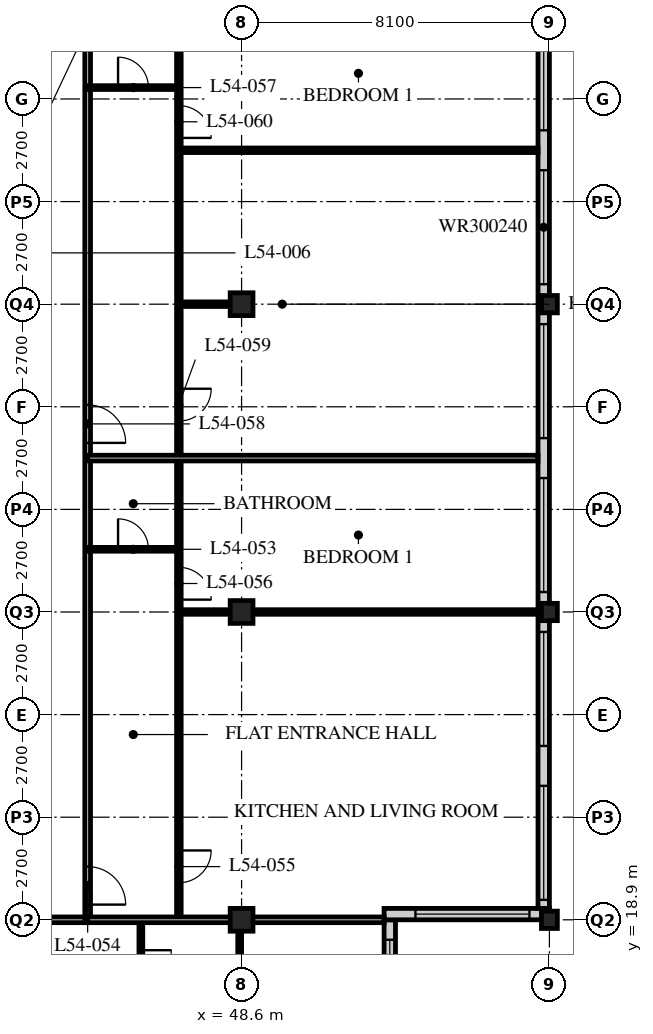
"""IFC4 building model, lengths in metres.
Left out: names, types, materials, properties, quantities, classifications, styles, units other than length and angle.
Written with IfcOpenShell. Run it as: python <this file> out.ifc"""

import sys

from ifc_helpers import new_model, si_unit, direction, frame, frame_2d, origin, origin_2d, place, context, subcontext, project, spatial, rectangle, hollow_rectangle, i_section, extrude, element, fill, save


model = new_model("IFC4")
c1 = context("Model", 3, precision=1e-05, world=origin(), true_north=direction((0.0, 1.0)))
c2 = subcontext(c1, "Body", "Model", "MODEL_VIEW")
j1 = project(units=[si_unit("LENGTHUNIT", "METRE"), si_unit("PLANEANGLEUNIT", "RADIAN")], contexts=[c1])
p1 = place(None, origin())
s1 = spatial("IfcSite", under=j1, at=p1, CompositionType="ELEMENT")
p2 = place(p1, origin())
s2 = spatial("IfcBuilding", under=s1, at=p2, CompositionType="ELEMENT")
p3 = place(p2, frame((0.0, 0.0, 210.0)))
s3 = spatial("IfcBuildingStorey", under=s2, at=p3, CompositionType="ELEMENT", Elevation=210.0)
for number, where, z_axis, x_axis in (
    (1, (48.6, 18.9, 0.0), (0.0, 0.0, 1.0), (1.0, 0.0, 0.0)),
    (2, (48.6, 27.0, 0.0), (0.0, 0.0, 1.0), (1.0, 0.0, 0.0)),
    (3, (48.6, 35.1, 0.0), (0.0, 0.0, 1.0), (1.0, 0.0, 0.0)),
):
    element("IfcColumn", number, at=place(p3, frame(where, z_axis=z_axis, x_axis=x_axis)), inside=s3, PredefinedType="COLUMN", context=c2, shape_type="SweptSolid", body=[
        extrude(hollow_rectangle(XDim=0.6, YDim=0.6, WallThickness=0.05, at=origin_2d()), origin(), (0.0, 0.0, 1.0), 3.6),
    ])
for number, where, z_axis, x_axis in (
    (4, (56.7, 18.9, 0.0), (0.0, 0.0, 1.0), (1.0, 0.0, 0.0)),
    (5, (56.7, 27.0, 0.0), (0.0, 0.0, 1.0), (1.0, 0.0, 0.0)),
    (6, (56.7, 35.1, 0.0), (0.0, 0.0, 1.0), (1.0, 0.0, 0.0)),
):
    element("IfcColumn", number, at=place(p3, frame(where, z_axis=z_axis, x_axis=x_axis)), inside=s3, PredefinedType="COLUMN", context=c2, shape_type="SweptSolid", body=[
        extrude(i_section(OverallWidth=0.418, OverallDepth=0.456, WebThickness=0.042, FlangeThickness=0.067, FilletRadius=0.015, at=origin_2d()), origin(), (0.0, 0.0, 1.0), 3.6),
    ])
p4 = place(p3, frame((52.5, 15.15, 0.0), z_axis=(0.0, 0.0, 1.0), x_axis=(0.0, 1.0, 0.0)))
e7 = element("IfcWall", 7, at=p4, inside=s3, PredefinedType="SOLIDWALL", context=c2, shape_type="SweptSolid", body=[
    extrude(rectangle(XDim=3.75, YDim=0.3, at=frame_2d((1.875, 0.0))), origin(), (0.0, 0.0, 1.0), 3.39),
])
p5 = place(p4, frame((0.225, 0.0, 0.6)))
e8 = element("IfcOpeningElement", 8, at=p5, cuts=e7, PredefinedType="OPENING", context=c2, shape_type="SweptSolid", body=[
    extrude(rectangle(XDim=3.0, YDim=2.0, at=frame_2d((1.5, 1.0))), frame((0.0, 0.16, 0.0), z_axis=(0.0, -1.0, 0.0), x_axis=(1.0, 0.0, 0.0)), (0.0, 0.0, 1.0), 0.32),
])
p6 = place(p3, frame((52.35, 19.05, 0.0), z_axis=(0.0, 0.0, 1.0), x_axis=(1.0, 0.0, 0.0)))
e9 = element("IfcWall", 9, at=p6, inside=s3, PredefinedType="SOLIDWALL", context=c2, shape_type="SweptSolid", body=[
    extrude(rectangle(XDim=4.35, YDim=0.3, at=frame_2d((2.175, 0.0))), origin(), (0.0, 0.0, 1.0), 3.39),
])
p7 = place(p6, frame((0.825, 0.0, 0.6)))
e10 = element("IfcOpeningElement", 10, at=p7, cuts=e9, PredefinedType="OPENING", context=c2, shape_type="SweptSolid", body=[
    extrude(rectangle(XDim=3.0, YDim=2.0, at=frame_2d((1.5, 1.0))), frame((0.0, 0.16, 0.0), z_axis=(0.0, -1.0, 0.0), x_axis=(1.0, 0.0, 0.0)), (0.0, 0.0, 1.0), 0.32),
])
p8 = place(p3, frame((56.55, 19.2, 0.0), z_axis=(0.0, 0.0, 1.0), x_axis=(0.0, 1.0, 0.0)))
e11 = element("IfcWall", 11, at=p8, inside=s3, PredefinedType="SOLIDWALL", context=c2, shape_type="SweptSolid", body=[
    extrude(rectangle(XDim=32.1, YDim=0.3, at=frame_2d((16.05, 0.0))), origin(), (0.0, 0.0, 1.0), 3.39),
])
p9 = place(p8, frame((0.225, 0.0, 0.6)))
e12 = element("IfcOpeningElement", 12, at=p9, cuts=e11, PredefinedType="OPENING", context=c2, shape_type="SweptSolid", body=[
    extrude(rectangle(XDim=3.0, YDim=2.4, at=frame_2d((1.5, 1.2))), frame((0.0, 0.16, 0.0), z_axis=(0.0, -1.0, 0.0), x_axis=(1.0, 0.0, 0.0)), (0.0, 0.0, 1.0), 0.32),
])
p10 = place(p8, frame((4.275, 0.0, 0.6)))
e13 = element("IfcOpeningElement", 13, at=p10, cuts=e11, PredefinedType="OPENING", context=c2, shape_type="SweptSolid", body=[
    extrude(rectangle(XDim=3.0, YDim=2.4, at=frame_2d((1.5, 1.2))), frame((0.0, 0.16, 0.0), z_axis=(0.0, -1.0, 0.0), x_axis=(1.0, 0.0, 0.0)), (0.0, 0.0, 1.0), 0.32),
])
p11 = place(p8, frame((8.325, 0.0, 0.6)))
e14 = element("IfcOpeningElement", 14, at=p11, cuts=e11, PredefinedType="OPENING", context=c2, shape_type="SweptSolid", body=[
    extrude(rectangle(XDim=3.0, YDim=2.4, at=frame_2d((1.5, 1.2))), frame((0.0, 0.16, 0.0), z_axis=(0.0, -1.0, 0.0), x_axis=(1.0, 0.0, 0.0)), (0.0, 0.0, 1.0), 0.32),
])
p12 = place(p8, frame((12.375, 0.0, 0.6)))
e15 = element("IfcOpeningElement", 15, at=p12, cuts=e11, PredefinedType="OPENING", context=c2, shape_type="SweptSolid", body=[
    extrude(rectangle(XDim=3.0, YDim=2.4, at=frame_2d((1.5, 1.2))), frame((0.0, 0.16, 0.0), z_axis=(0.0, -1.0, 0.0), x_axis=(1.0, 0.0, 0.0)), (0.0, 0.0, 1.0), 0.32),
])
p13 = place(p8, frame((16.425, 0.0, 0.6)))
e16 = element("IfcOpeningElement", 16, at=p13, cuts=e11, PredefinedType="OPENING", context=c2, shape_type="SweptSolid", body=[
    extrude(rectangle(XDim=3.0, YDim=2.4, at=frame_2d((1.5, 1.2))), frame((0.0, 0.16, 0.0), z_axis=(0.0, -1.0, 0.0), x_axis=(1.0, 0.0, 0.0)), (0.0, 0.0, 1.0), 0.32),
])
p14 = place(p8, frame((20.475, 0.0, 0.6)))
e17 = element("IfcOpeningElement", 17, at=p14, cuts=e11, PredefinedType="OPENING", context=c2, shape_type="SweptSolid", body=[
    extrude(rectangle(XDim=3.0, YDim=2.4, at=frame_2d((1.5, 1.2))), frame((0.0, 0.16, 0.0), z_axis=(0.0, -1.0, 0.0), x_axis=(1.0, 0.0, 0.0)), (0.0, 0.0, 1.0), 0.32),
])
p15 = place(p8, frame((24.525, 0.0, 0.6)))
e18 = element("IfcOpeningElement", 18, at=p15, cuts=e11, PredefinedType="OPENING", context=c2, shape_type="SweptSolid", body=[
    extrude(rectangle(XDim=3.0, YDim=2.4, at=frame_2d((1.5, 1.2))), frame((0.0, 0.16, 0.0), z_axis=(0.0, -1.0, 0.0), x_axis=(1.0, 0.0, 0.0)), (0.0, 0.0, 1.0), 0.32),
])
p16 = place(p8, frame((28.575, 0.0, 0.6)))
e19 = element("IfcOpeningElement", 19, at=p16, cuts=e11, PredefinedType="OPENING", context=c2, shape_type="SweptSolid", body=[
    extrude(rectangle(XDim=3.0, YDim=2.4, at=frame_2d((1.5, 1.2))), frame((0.0, 0.16, 0.0), z_axis=(0.0, -1.0, 0.0), x_axis=(1.0, 0.0, 0.0)), (0.0, 0.0, 1.0), 0.32),
])
p17 = place(p3, frame((8.1, 18.9, 0.0), z_axis=(0.0, 0.0, 1.0), x_axis=(1.0, 0.0, 0.0)))
e20 = element("IfcWall", 20, at=p17, inside=s3, PredefinedType="PARTITIONING", context=c2, shape_type="SweptSolid", body=[
    extrude(rectangle(XDim=36.45, YDim=0.15, at=frame_2d((18.225, 0.0))), origin(), (0.0, 0.0, 1.0), 2.778),
])
p18 = place(p17, frame((4.45, 0.0, 0.0)))
e21 = element("IfcOpeningElement", 21, at=p18, cuts=e20, PredefinedType="OPENING", context=c2, shape_type="SweptSolid", body=[
    extrude(rectangle(XDim=1.0, YDim=2.1, at=frame_2d((0.5, 1.05))), frame((0.0, 0.085, 0.0), z_axis=(0.0, -1.0, 0.0), x_axis=(1.0, 0.0, 0.0)), (0.0, 0.0, 1.0), 0.17),
])
p19 = place(p17, frame((12.55, 0.0, 0.0)))
e22 = element("IfcOpeningElement", 22, at=p19, cuts=e20, PredefinedType="OPENING", context=c2, shape_type="SweptSolid", body=[
    extrude(rectangle(XDim=1.0, YDim=2.1, at=frame_2d((0.5, 1.05))), frame((0.0, 0.085, 0.0), z_axis=(0.0, -1.0, 0.0), x_axis=(1.0, 0.0, 0.0)), (0.0, 0.0, 1.0), 0.17),
])
p20 = place(p17, frame((29.05, 0.0, 0.0)))
e23 = element("IfcOpeningElement", 23, at=p20, cuts=e20, PredefinedType="OPENING", context=c2, shape_type="SweptSolid", body=[
    extrude(rectangle(XDim=1.0, YDim=2.1, at=frame_2d((0.5, 1.05))), frame((0.0, 0.085, 0.0), z_axis=(0.0, -1.0, 0.0), x_axis=(1.0, 0.0, 0.0)), (0.0, 0.0, 1.0), 0.17),
])
p21 = place(p17, frame((2.625, 0.0, 0.0)))
e24 = element("IfcOpeningElement", 24, at=p21, cuts=e20, PredefinedType="OPENING", context=c2, shape_type="SweptSolid", body=[
    extrude(rectangle(XDim=1.0, YDim=2.1, at=frame_2d((0.5, 1.05))), frame((0.0, 0.085, 0.0), z_axis=(0.0, -1.0, 0.0), x_axis=(1.0, 0.0, 0.0)), (0.0, 0.0, 1.0), 0.17),
])
p22 = place(p17, frame((33.925, 0.0, 0.0)))
e25 = element("IfcOpeningElement", 25, at=p22, cuts=e20, PredefinedType="OPENING", context=c2, shape_type="SweptSolid", body=[
    extrude(rectangle(XDim=1.0, YDim=2.1, at=frame_2d((0.5, 1.05))), frame((0.0, 0.085, 0.0), z_axis=(0.0, -1.0, 0.0), x_axis=(1.0, 0.0, 0.0)), (0.0, 0.0, 1.0), 0.17),
])
p23 = place(p3, frame((44.55, 18.9, 0.0), z_axis=(0.0, 0.0, 1.0), x_axis=(0.0, 1.0, 0.0)))
e26 = element("IfcWall", 26, at=p23, inside=s3, PredefinedType="PARTITIONING", context=c2, shape_type="SweptSolid", body=[
    extrude(rectangle(XDim=28.35, YDim=0.15, at=frame_2d((14.175, 0.0))), origin(), (0.0, 0.0, 1.0), 3.39),
])
p24 = place(p23, frame((0.4, 0.0, 0.0)))
e27 = element("IfcOpeningElement", 27, at=p24, cuts=e26, PredefinedType="OPENING", context=c2, shape_type="SweptSolid", body=[
    extrude(rectangle(XDim=1.0, YDim=2.1, at=frame_2d((0.5, 1.05))), frame((0.0, 0.085, 0.0), z_axis=(0.0, -1.0, 0.0), x_axis=(1.0, 0.0, 0.0)), (0.0, 0.0, 1.0), 0.17),
])
p25 = place(p23, frame((12.55, 0.0, 0.0)))
e28 = element("IfcOpeningElement", 28, at=p25, cuts=e26, PredefinedType="OPENING", context=c2, shape_type="SweptSolid", body=[
    extrude(rectangle(XDim=1.0, YDim=2.1, at=frame_2d((0.5, 1.05))), frame((0.0, 0.085, 0.0), z_axis=(0.0, -1.0, 0.0), x_axis=(1.0, 0.0, 0.0)), (0.0, 0.0, 1.0), 0.17),
])
p26 = place(p23, frame((26.65, 0.0, 0.0)))
e29 = element("IfcOpeningElement", 29, at=p26, cuts=e26, PredefinedType="OPENING", context=c2, shape_type="SweptSolid", body=[
    extrude(rectangle(XDim=1.0, YDim=2.1, at=frame_2d((0.5, 1.05))), frame((0.0, 0.085, 0.0), z_axis=(0.0, -1.0, 0.0), x_axis=(1.0, 0.0, 0.0)), (0.0, 0.0, 1.0), 0.17),
])
p27 = place(p3, frame((46.95, 18.9, 0.0), z_axis=(0.0, 0.0, 1.0), x_axis=(0.0, 1.0, 0.0)))
e30 = element("IfcWall", 30, at=p27, inside=s3, PredefinedType="PARTITIONING", context=c2, shape_type="SweptSolid", body=[
    extrude(rectangle(XDim=24.3, YDim=0.12, at=frame_2d((12.15, 0.0))), origin(), (0.0, 0.0, 1.0), 3.39),
])
p28 = place(p27, frame((0.975, 0.0, 0.0)))
e31 = element("IfcOpeningElement", 31, at=p28, cuts=e30, PredefinedType="OPENING", context=c2, shape_type="SweptSolid", body=[
    extrude(rectangle(XDim=0.85, YDim=2.1, at=frame_2d((0.425, 1.05))), frame((0.0, 0.07, 0.0), z_axis=(0.0, -1.0, 0.0), x_axis=(1.0, 0.0, 0.0)), (0.0, 0.0, 1.0), 0.14),
])
p29 = place(p27, frame((8.425, 0.0, 0.0)))
e32 = element("IfcOpeningElement", 32, at=p29, cuts=e30, PredefinedType="OPENING", context=c2, shape_type="SweptSolid", body=[
    extrude(rectangle(XDim=0.85, YDim=2.1, at=frame_2d((0.425, 1.05))), frame((0.0, 0.07, 0.0), z_axis=(0.0, -1.0, 0.0), x_axis=(1.0, 0.0, 0.0)), (0.0, 0.0, 1.0), 0.14),
])
p30 = place(p27, frame((13.125, 0.0, 0.0)))
e33 = element("IfcOpeningElement", 33, at=p30, cuts=e30, PredefinedType="OPENING", context=c2, shape_type="SweptSolid", body=[
    extrude(rectangle(XDim=0.85, YDim=2.1, at=frame_2d((0.425, 1.05))), frame((0.0, 0.07, 0.0), z_axis=(0.0, -1.0, 0.0), x_axis=(1.0, 0.0, 0.0)), (0.0, 0.0, 1.0), 0.14),
])
p31 = place(p27, frame((20.575, 0.0, 0.0)))
e34 = element("IfcOpeningElement", 34, at=p31, cuts=e30, PredefinedType="OPENING", context=c2, shape_type="SweptSolid", body=[
    extrude(rectangle(XDim=0.85, YDim=2.1, at=frame_2d((0.425, 1.05))), frame((0.0, 0.07, 0.0), z_axis=(0.0, -1.0, 0.0), x_axis=(1.0, 0.0, 0.0)), (0.0, 0.0, 1.0), 0.14),
])
p32 = place(p3, frame((44.55, 28.65, 0.0), z_axis=(0.0, 0.0, 1.0), x_axis=(1.0, 0.0, 0.0)))
e35 = element("IfcWall", 35, at=p32, inside=s3, PredefinedType="PARTITIONING", context=c2, shape_type="SweptSolid", body=[
    extrude(rectangle(XDim=2.4, YDim=0.1, at=frame_2d((1.2, 0.0))), origin(), (0.0, 0.0, 1.0), 3.39),
])
p33 = place(p32, frame((0.8, 0.0, 0.0)))
e36 = element("IfcOpeningElement", 36, at=p33, cuts=e35, PredefinedType="OPENING", context=c2, shape_type="SweptSolid", body=[
    extrude(rectangle(XDim=0.8, YDim=2.1, at=frame_2d((0.4, 1.05))), frame((0.0, 0.06, 0.0), z_axis=(0.0, -1.0, 0.0), x_axis=(1.0, 0.0, 0.0)), (0.0, 0.0, 1.0), 0.12),
])
p34 = place(p3, frame((46.95, 27.0, 0.0), z_axis=(0.0, 0.0, 1.0), x_axis=(1.0, 0.0, 0.0)))
e37 = element("IfcWall", 37, at=p34, inside=s3, PredefinedType="PARTITIONING", context=c2, shape_type="SweptSolid", body=[
    extrude(rectangle(XDim=9.45, YDim=0.12, at=frame_2d((4.725, 0.0))), origin(), (0.0, 0.0, 1.0), 2.778),
])
p35 = place(p3, frame((44.55, 31.05, 0.0), z_axis=(0.0, 0.0, 1.0), x_axis=(1.0, 0.0, 0.0)))
e38 = element("IfcWall", 38, at=p35, inside=s3, PredefinedType="PARTITIONING", context=c2, shape_type="SweptSolid", body=[
    extrude(rectangle(XDim=11.85, YDim=0.15, at=frame_2d((5.925, 0.0))), origin(), (0.0, 0.0, 1.0), 3.39),
])
p36 = place(p3, frame((44.55, 40.8, 0.0), z_axis=(0.0, 0.0, 1.0), x_axis=(1.0, 0.0, 0.0)))
e39 = element("IfcWall", 39, at=p36, inside=s3, PredefinedType="PARTITIONING", context=c2, shape_type="SweptSolid", body=[
    extrude(rectangle(XDim=2.4, YDim=0.1, at=frame_2d((1.2, 0.0))), origin(), (0.0, 0.0, 1.0), 3.39),
])
p37 = place(p36, frame((0.8, 0.0, 0.0)))
e40 = element("IfcOpeningElement", 40, at=p37, cuts=e39, PredefinedType="OPENING", context=c2, shape_type="SweptSolid", body=[
    extrude(rectangle(XDim=0.8, YDim=2.1, at=frame_2d((0.4, 1.05))), frame((0.0, 0.06, 0.0), z_axis=(0.0, -1.0, 0.0), x_axis=(1.0, 0.0, 0.0)), (0.0, 0.0, 1.0), 0.12),
])
p38 = place(p3, frame((46.95, 39.15, 0.0), z_axis=(0.0, 0.0, 1.0), x_axis=(1.0, 0.0, 0.0)))
e41 = element("IfcWall", 41, at=p38, inside=s3, PredefinedType="PARTITIONING", context=c2, shape_type="SweptSolid", body=[
    extrude(rectangle(XDim=9.45, YDim=0.12, at=frame_2d((4.725, 0.0))), origin(), (0.0, 0.0, 1.0), 3.39),
])
p39 = place(p3, frame((45.95, 18.9, 0.0), z_axis=(0.0, 0.0, 1.0), x_axis=(0.0, -1.0, 0.0)))
e42 = element("IfcWall", 42, at=p39, inside=s3, PredefinedType="PARTITIONING", context=c2, shape_type="SweptSolid", body=[
    extrude(rectangle(XDim=2.4, YDim=0.1, at=frame_2d((1.2, 0.0))), origin(), (0.0, 0.0, 1.0), 3.39),
])
p40 = place(p39, frame((0.8, 0.0, 0.0)))
e43 = element("IfcOpeningElement", 43, at=p40, cuts=e42, PredefinedType="OPENING", context=c2, shape_type="SweptSolid", body=[
    extrude(rectangle(XDim=0.8, YDim=2.1, at=frame_2d((0.4, 1.05))), frame((0.0, 0.06, 0.0), z_axis=(0.0, -1.0, 0.0), x_axis=(1.0, 0.0, 0.0)), (0.0, 0.0, 1.0), 0.12),
])
p41 = place(p3, frame((48.55, 18.9, 0.0), z_axis=(0.0, 0.0, 1.0), x_axis=(0.0, -1.0, 0.0)))
e44 = element("IfcWall", 44, at=p41, inside=s3, PredefinedType="PARTITIONING", context=c2, shape_type="SweptSolid", body=[
    extrude(rectangle(XDim=2.4, YDim=0.1, at=frame_2d((1.2, 0.0))), origin(), (0.0, 0.0, 1.0), 2.778),
])
p42 = place(p3, frame((44.55, 18.9, 0.0), z_axis=(0.0, 0.0, 1.0), x_axis=(1.0, 0.0, 0.0)))
e45 = element("IfcWall", 45, at=p42, inside=s3, PredefinedType="PARTITIONING", context=c2, shape_type="SweptSolid", body=[
    extrude(rectangle(XDim=7.8, YDim=0.15, at=frame_2d((3.9, 0.0))), origin(), (0.0, 0.0, 1.0), 2.778),
])
p43 = place(p3, frame((46.95, 35.1, 0.0), z_axis=(0.0, 0.0, 1.0), x_axis=(1.0, 0.0, 0.0)))
e46 = element("IfcWall", 46, at=p43, inside=s3, PredefinedType="PARTITIONING", context=c2, shape_type="SweptSolid", body=[
    extrude(rectangle(XDim=1.35, YDim=0.12, at=frame_2d((0.675, 0.0))), origin(), (0.0, 0.0, 1.0), 2.778),
])
p44 = place(p5, origin())
e47 = element("IfcWindow", 47, at=p44, inside=s3, PartitioningType="SINGLE_PANEL", PredefinedType="WINDOW", context=c2, shape_type="SweptSolid", body=[
    extrude(rectangle(XDim=3.0, YDim=2.0, at=frame_2d((1.5, 1.0))), frame((0.0, 0.03, 0.0), z_axis=(0.0, -1.0, 0.0), x_axis=(1.0, 0.0, 0.0)), (0.0, 0.0, 1.0), 0.06),
])
fill(e8, e47)
p45 = place(p7, origin())
e48 = element("IfcWindow", 48, at=p45, inside=s3, PartitioningType="SINGLE_PANEL", PredefinedType="WINDOW", context=c2, shape_type="SweptSolid", body=[
    extrude(rectangle(XDim=3.0, YDim=2.0, at=frame_2d((1.5, 1.0))), frame((0.0, 0.03, 0.0), z_axis=(0.0, -1.0, 0.0), x_axis=(1.0, 0.0, 0.0)), (0.0, 0.0, 1.0), 0.06),
])
fill(e10, e48)
p46 = place(p9, origin())
e49 = element("IfcWindow", 49, at=p46, inside=s3, PartitioningType="SINGLE_PANEL", PredefinedType="WINDOW", context=c2, shape_type="SweptSolid", body=[
    extrude(rectangle(XDim=3.0, YDim=2.4, at=frame_2d((1.5, 1.2))), frame((0.0, 0.03, 0.0), z_axis=(0.0, -1.0, 0.0), x_axis=(1.0, 0.0, 0.0)), (0.0, 0.0, 1.0), 0.06),
])
fill(e12, e49)
p47 = place(p10, origin())
e50 = element("IfcWindow", 50, at=p47, inside=s3, PartitioningType="SINGLE_PANEL", PredefinedType="WINDOW", context=c2, shape_type="SweptSolid", body=[
    extrude(rectangle(XDim=3.0, YDim=2.4, at=frame_2d((1.5, 1.2))), frame((0.0, 0.03, 0.0), z_axis=(0.0, -1.0, 0.0), x_axis=(1.0, 0.0, 0.0)), (0.0, 0.0, 1.0), 0.06),
])
fill(e13, e50)
p48 = place(p11, origin())
e51 = element("IfcWindow", 51, at=p48, inside=s3, PartitioningType="SINGLE_PANEL", PredefinedType="WINDOW", context=c2, shape_type="SweptSolid", body=[
    extrude(rectangle(XDim=3.0, YDim=2.4, at=frame_2d((1.5, 1.2))), frame((0.0, 0.03, 0.0), z_axis=(0.0, -1.0, 0.0), x_axis=(1.0, 0.0, 0.0)), (0.0, 0.0, 1.0), 0.06),
])
fill(e14, e51)
p49 = place(p12, origin())
e52 = element("IfcWindow", 52, at=p49, inside=s3, PartitioningType="SINGLE_PANEL", PredefinedType="WINDOW", context=c2, shape_type="SweptSolid", body=[
    extrude(rectangle(XDim=3.0, YDim=2.4, at=frame_2d((1.5, 1.2))), frame((0.0, 0.03, 0.0), z_axis=(0.0, -1.0, 0.0), x_axis=(1.0, 0.0, 0.0)), (0.0, 0.0, 1.0), 0.06),
])
fill(e15, e52)
p50 = place(p13, origin())
e53 = element("IfcWindow", 53, at=p50, inside=s3, PartitioningType="SINGLE_PANEL", PredefinedType="WINDOW", context=c2, shape_type="SweptSolid", body=[
    extrude(rectangle(XDim=3.0, YDim=2.4, at=frame_2d((1.5, 1.2))), frame((0.0, 0.03, 0.0), z_axis=(0.0, -1.0, 0.0), x_axis=(1.0, 0.0, 0.0)), (0.0, 0.0, 1.0), 0.06),
])
fill(e16, e53)
p51 = place(p14, origin())
e54 = element("IfcWindow", 54, at=p51, inside=s3, PartitioningType="SINGLE_PANEL", PredefinedType="WINDOW", context=c2, shape_type="SweptSolid", body=[
    extrude(rectangle(XDim=3.0, YDim=2.4, at=frame_2d((1.5, 1.2))), frame((0.0, 0.03, 0.0), z_axis=(0.0, -1.0, 0.0), x_axis=(1.0, 0.0, 0.0)), (0.0, 0.0, 1.0), 0.06),
])
fill(e17, e54)
p52 = place(p33, origin())
e55 = element("IfcDoor", 55, at=p52, inside=s3, OperationType="SINGLE_SWING_LEFT", PredefinedType="DOOR", context=c2, shape_type="SweptSolid", body=[
    extrude(rectangle(XDim=0.8, YDim=2.1, at=frame_2d((0.4, 1.05))), frame((0.0, 0.025, 0.0), z_axis=(0.0, -1.0, 0.0), x_axis=(1.0, 0.0, 0.0)), (0.0, 0.0, 1.0), 0.05),
])
fill(e36, e55)
p53 = place(p24, origin())
e56 = element("IfcDoor", 56, at=p53, inside=s3, OperationType="SINGLE_SWING_RIGHT", PredefinedType="DOOR", context=c2, shape_type="SweptSolid", body=[
    extrude(rectangle(XDim=1.0, YDim=2.1, at=frame_2d((0.5, 1.05))), frame((0.0, 0.025, 0.0), z_axis=(0.0, -1.0, 0.0), x_axis=(1.0, 0.0, 0.0)), (0.0, 0.0, 1.0), 0.05),
])
fill(e27, e56)
p54 = place(p28, origin())
e57 = element("IfcDoor", 57, at=p54, inside=s3, OperationType="SINGLE_SWING_LEFT", PredefinedType="DOOR", context=c2, shape_type="SweptSolid", body=[
    extrude(rectangle(XDim=0.85, YDim=2.1, at=frame_2d((0.425, 1.05))), frame((0.0, 0.025, 0.0), z_axis=(0.0, -1.0, 0.0), x_axis=(1.0, 0.0, 0.0)), (0.0, 0.0, 1.0), 0.05),
])
fill(e31, e57)
p55 = place(p29, origin())
e58 = element("IfcDoor", 58, at=p55, inside=s3, OperationType="SINGLE_SWING_RIGHT", PredefinedType="DOOR", context=c2, shape_type="SweptSolid", body=[
    extrude(rectangle(XDim=0.85, YDim=2.1, at=frame_2d((0.425, 1.05))), frame((0.0, 0.025, 0.0), z_axis=(0.0, -1.0, 0.0), x_axis=(1.0, 0.0, 0.0)), (0.0, 0.0, 1.0), 0.05),
])
fill(e32, e58)
p56 = place(p37, origin())
e59 = element("IfcDoor", 59, at=p56, inside=s3, OperationType="SINGLE_SWING_LEFT", PredefinedType="DOOR", context=c2, shape_type="SweptSolid", body=[
    extrude(rectangle(XDim=0.8, YDim=2.1, at=frame_2d((0.4, 1.05))), frame((0.0, 0.025, 0.0), z_axis=(0.0, -1.0, 0.0), x_axis=(1.0, 0.0, 0.0)), (0.0, 0.0, 1.0), 0.05),
])
fill(e40, e59)
p57 = place(p25, origin())
e60 = element("IfcDoor", 60, at=p57, inside=s3, OperationType="SINGLE_SWING_RIGHT", PredefinedType="DOOR", context=c2, shape_type="SweptSolid", body=[
    extrude(rectangle(XDim=1.0, YDim=2.1, at=frame_2d((0.5, 1.05))), frame((0.0, 0.025, 0.0), z_axis=(0.0, -1.0, 0.0), x_axis=(1.0, 0.0, 0.0)), (0.0, 0.0, 1.0), 0.05),
])
fill(e28, e60)
p58 = place(p30, origin())
e61 = element("IfcDoor", 61, at=p58, inside=s3, OperationType="SINGLE_SWING_LEFT", PredefinedType="DOOR", context=c2, shape_type="SweptSolid", body=[
    extrude(rectangle(XDim=0.85, YDim=2.1, at=frame_2d((0.425, 1.05))), frame((0.0, 0.025, 0.0), z_axis=(0.0, -1.0, 0.0), x_axis=(1.0, 0.0, 0.0)), (0.0, 0.0, 1.0), 0.05),
])
fill(e33, e61)
p59 = place(p31, origin())
e62 = element("IfcDoor", 62, at=p59, inside=s3, OperationType="SINGLE_SWING_RIGHT", PredefinedType="DOOR", context=c2, shape_type="SweptSolid", body=[
    extrude(rectangle(XDim=0.85, YDim=2.1, at=frame_2d((0.425, 1.05))), frame((0.0, 0.025, 0.0), z_axis=(0.0, -1.0, 0.0), x_axis=(1.0, 0.0, 0.0)), (0.0, 0.0, 1.0), 0.05),
])
fill(e34, e62)
p60 = place(p40, origin())
e63 = element("IfcDoor", 63, at=p60, inside=s3, OperationType="SINGLE_SWING_LEFT", PredefinedType="DOOR", context=c2, shape_type="SweptSolid", body=[
    extrude(rectangle(XDim=0.8, YDim=2.1, at=frame_2d((0.4, 1.05))), frame((0.0, 0.025, 0.0), z_axis=(0.0, -1.0, 0.0), x_axis=(1.0, 0.0, 0.0)), (0.0, 0.0, 1.0), 0.05),
])
fill(e43, e63)
save(model, sys.argv[1])
